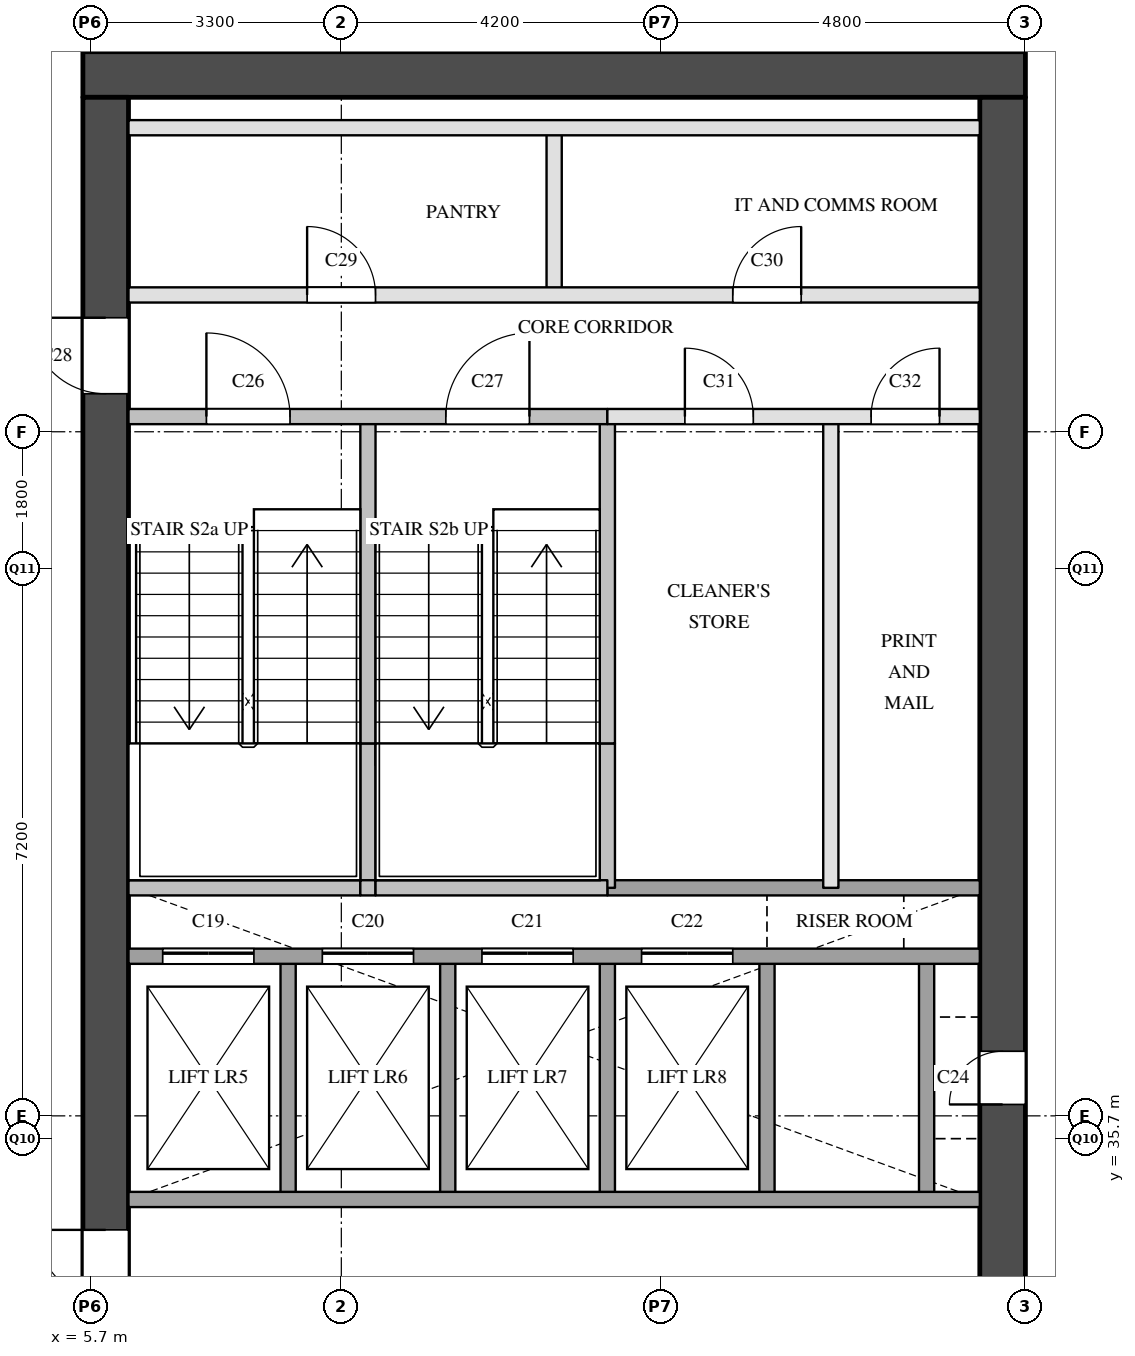
"""IFC4 building model, lengths in metres.
Left out: names, types, materials, properties, quantities, classifications, styles, units other than length and angle.
Written with IfcOpenShell. Run it as: python <this file> out.ifc"""

import sys

from ifc_helpers import new_model, si_unit, direction, frame, frame_2d, origin, place, context, subcontext, project, spatial, rectangle, extrude, element, fill, save


model = new_model("IFC4")
c1 = context("Model", 3, precision=1e-05, world=origin(), true_north=direction((0.0, 1.0)))
c2 = subcontext(c1, "Body", "Model", "MODEL_VIEW")
j1 = project(units=[si_unit("LENGTHUNIT", "METRE"), si_unit("PLANEANGLEUNIT", "RADIAN")], contexts=[c1])
p1 = place(None, origin())
s1 = spatial("IfcSite", under=j1, at=p1, CompositionType="ELEMENT")
p2 = place(p1, origin())
s2 = spatial("IfcBuilding", under=s1, at=p2, CompositionType="ELEMENT")
p3 = place(p2, frame((0.0, 0.0, 77.8)))
s3 = spatial("IfcBuildingStorey", under=s2, at=p3, CompositionType="ELEMENT", Elevation=77.8)
p4 = place(p3, frame((5.6, 49.7, 0.0), z_axis=(0.0, 0.0, 1.0), x_axis=(1.0, 0.0, 0.0)))
e1 = element("IfcWall", 1, at=p4, inside=s3, PredefinedType="SHEAR", context=c2, shape_type="SweptSolid", body=[
    extrude(rectangle(XDim=12.4, YDim=0.6, at=frame_2d((6.2, 0.0))), origin(), (0.0, 0.0, 1.0), 3.5),
])
p5 = place(p3, frame((5.9, 29.1, 0.0), z_axis=(0.0, 0.0, 1.0), x_axis=(0.0, 1.0, 0.0)))
e2 = element("IfcWall", 2, at=p5, inside=s3, PredefinedType="SHEAR", context=c2, shape_type="SweptSolid", body=[
    extrude(rectangle(XDim=20.3, YDim=0.6, at=frame_2d((10.15, 0.0))), origin(), (0.0, 0.0, 1.0), 3.5),
])
p6 = place(p5, frame((3.6, 0.0, 0.0)))
e3 = element("IfcOpeningElement", 3, at=p6, cuts=e2, PredefinedType="OPENING", context=c2, shape_type="SweptSolid", body=[
    extrude(rectangle(XDim=1.8, YDim=2.1, at=frame_2d((0.9, 1.05))), frame((0.0, 0.31, 0.0), z_axis=(0.0, -1.0, 0.0), x_axis=(1.0, 0.0, 0.0)), (0.0, 0.0, 1.0), 0.62),
])
p7 = place(p5, frame((16.4, 0.0, 0.0)))
e4 = element("IfcOpeningElement", 4, at=p7, cuts=e2, PredefinedType="OPENING", context=c2, shape_type="SweptSolid", body=[
    extrude(rectangle(XDim=1.0, YDim=2.1, at=frame_2d((0.5, 1.05))), frame((0.0, 0.31, 0.0), z_axis=(0.0, -1.0, 0.0), x_axis=(1.0, 0.0, 0.0)), (0.0, 0.0, 1.0), 0.62),
])
p8 = place(p3, frame((17.7, 29.1, 0.0), z_axis=(0.0, 0.0, 1.0), x_axis=(0.0, 1.0, 0.0)))
e5 = element("IfcWall", 5, at=p8, inside=s3, PredefinedType="SHEAR", context=c2, shape_type="SweptSolid", body=[
    extrude(rectangle(XDim=20.3, YDim=0.6, at=frame_2d((10.15, 0.0))), origin(), (0.0, 0.0, 1.0), 3.5),
])
p9 = place(p8, frame((1.25, 0.0, 0.0)))
e6 = element("IfcOpeningElement", 6, at=p9, cuts=e5, PredefinedType="OPENING", context=c2, shape_type="SweptSolid", body=[
    extrude(rectangle(XDim=0.7, YDim=2.1, at=frame_2d((0.35, 1.05))), frame((0.0, 0.31, 0.0), z_axis=(0.0, -1.0, 0.0), x_axis=(1.0, 0.0, 0.0)), (0.0, 0.0, 1.0), 0.62),
])
p10 = place(p8, frame((7.05, 0.0, 0.0)))
e7 = element("IfcOpeningElement", 7, at=p10, cuts=e5, PredefinedType="OPENING", context=c2, shape_type="SweptSolid", body=[
    extrude(rectangle(XDim=0.7, YDim=2.1, at=frame_2d((0.35, 1.05))), frame((0.0, 0.31, 0.0), z_axis=(0.0, -1.0, 0.0), x_axis=(1.0, 0.0, 0.0)), (0.0, 0.0, 1.0), 0.62),
])
p11 = place(p3, frame((8.3, 34.9, 0.0), z_axis=(0.0, 0.0, 1.0), x_axis=(0.0, 1.0, 0.0)))
e8 = element("IfcWall", 8, at=p11, inside=s3, PredefinedType="SOLIDWALL", context=c2, shape_type="SweptSolid", body=[
    extrude(rectangle(XDim=3.2, YDim=0.2, at=frame_2d((1.6, 0.0))), origin(), (0.0, 0.0, 1.0), 3.5),
])
p12 = place(p3, frame((9.35, 39.0, 0.0), z_axis=(0.0, 0.0, 1.0), x_axis=(0.0, 1.0, 0.0)))
e9 = element("IfcWall", 9, at=p12, inside=s3, PredefinedType="SOLIDWALL", context=c2, shape_type="SweptSolid", body=[
    extrude(rectangle(XDim=1.9, YDim=0.2, at=frame_2d((0.95, 0.0))), origin(), (0.0, 0.0, 1.0), 3.5),
])
p13 = place(p3, frame((9.35, 40.9, 0.0), z_axis=(0.0, 0.0, 1.0), x_axis=(0.0, 1.0, 0.0)))
e10 = element("IfcWall", 10, at=p13, inside=s3, PredefinedType="SOLIDWALL", context=c2, shape_type="SweptSolid", body=[
    extrude(rectangle(XDim=4.3, YDim=0.2, at=frame_2d((2.15, 0.0))), origin(), (0.0, 0.0, 1.0), 3.5),
])
p14 = place(p3, frame((10.4, 34.9, 0.0), z_axis=(0.0, 0.0, 1.0), x_axis=(0.0, 1.0, 0.0)))
e11 = element("IfcWall", 11, at=p14, inside=s3, PredefinedType="SOLIDWALL", context=c2, shape_type="SweptSolid", body=[
    extrude(rectangle(XDim=3.2, YDim=0.2, at=frame_2d((1.6, 0.0))), origin(), (0.0, 0.0, 1.0), 3.5),
])
p15 = place(p3, frame((11.8, 46.8, 0.0), z_axis=(0.0, 0.0, 1.0), x_axis=(0.0, 1.0, 0.0)))
e12 = element("IfcWall", 12, at=p15, inside=s3, PredefinedType="PARTITIONING", context=c2, shape_type="SweptSolid", body=[
    extrude(rectangle(XDim=2.2, YDim=0.2, at=frame_2d((1.1, 0.0))), origin(), (0.0, 0.0, 1.0), 3.5),
])
p16 = place(p3, frame((12.5, 34.9, 0.0), z_axis=(0.0, 0.0, 1.0), x_axis=(0.0, 1.0, 0.0)))
e13 = element("IfcWall", 13, at=p16, inside=s3, PredefinedType="SOLIDWALL", context=c2, shape_type="SweptSolid", body=[
    extrude(rectangle(XDim=3.2, YDim=0.2, at=frame_2d((1.6, 0.0))), origin(), (0.0, 0.0, 1.0), 3.5),
])
p17 = place(p3, frame((12.5, 39.0, 0.0), z_axis=(0.0, 0.0, 1.0), x_axis=(0.0, 1.0, 0.0)))
e14 = element("IfcWall", 14, at=p17, inside=s3, PredefinedType="SOLIDWALL", context=c2, shape_type="SweptSolid", body=[
    extrude(rectangle(XDim=1.9, YDim=0.2, at=frame_2d((0.95, 0.0))), origin(), (0.0, 0.0, 1.0), 3.5),
])
p18 = place(p3, frame((12.5, 40.9, 0.0), z_axis=(0.0, 0.0, 1.0), x_axis=(0.0, 1.0, 0.0)))
e15 = element("IfcWall", 15, at=p18, inside=s3, PredefinedType="SOLIDWALL", context=c2, shape_type="SweptSolid", body=[
    extrude(rectangle(XDim=4.3, YDim=0.2, at=frame_2d((2.15, 0.0))), origin(), (0.0, 0.0, 1.0), 3.5),
])
p19 = place(p3, frame((14.6, 34.9, 0.0), z_axis=(0.0, 0.0, 1.0), x_axis=(0.0, 1.0, 0.0)))
e16 = element("IfcWall", 16, at=p19, inside=s3, PredefinedType="SOLIDWALL", context=c2, shape_type="SweptSolid", body=[
    extrude(rectangle(XDim=3.2, YDim=0.2, at=frame_2d((1.6, 0.0))), origin(), (0.0, 0.0, 1.0), 3.5),
])
p20 = place(p3, frame((15.44, 39.0, 0.0), z_axis=(0.0, 0.0, 1.0), x_axis=(0.0, 1.0, 0.0)))
e17 = element("IfcWall", 17, at=p20, inside=s3, PredefinedType="PARTITIONING", context=c2, shape_type="SweptSolid", body=[
    extrude(rectangle(XDim=6.2, YDim=0.2, at=frame_2d((3.1, 0.0))), origin(), (0.0, 0.0, 1.0), 3.5),
])
p21 = place(p3, frame((16.7, 34.9, 0.0), z_axis=(0.0, 0.0, 1.0), x_axis=(0.0, 1.0, 0.0)))
e18 = element("IfcWall", 18, at=p21, inside=s3, PredefinedType="SOLIDWALL", context=c2, shape_type="SweptSolid", body=[
    extrude(rectangle(XDim=3.2, YDim=0.2, at=frame_2d((1.6, 0.0))), origin(), (0.0, 0.0, 1.0), 3.5),
])
p22 = place(p3, frame((6.2, 34.9, 0.0), z_axis=(0.0, 0.0, 1.0), x_axis=(1.0, 0.0, 0.0)))
e19 = element("IfcWall", 19, at=p22, inside=s3, PredefinedType="SOLIDWALL", context=c2, shape_type="SweptSolid", body=[
    extrude(rectangle(XDim=11.2, YDim=0.2, at=frame_2d((5.6, 0.0))), origin(), (0.0, 0.0, 1.0), 3.5),
])
p23 = place(p3, frame((6.2, 38.1, 0.0), z_axis=(0.0, 0.0, 1.0), x_axis=(1.0, 0.0, 0.0)))
e20 = element("IfcWall", 20, at=p23, inside=s3, PredefinedType="SOLIDWALL", context=c2, shape_type="SweptSolid", body=[
    extrude(rectangle(XDim=11.2, YDim=0.2, at=frame_2d((5.6, 0.0))), origin(), (0.0, 0.0, 1.0), 3.5),
])
p24 = place(p23, frame((0.45, 0.0, 0.0)))
e21 = element("IfcOpeningElement", 21, at=p24, cuts=e20, PredefinedType="OPENING", context=c2, shape_type="SweptSolid", body=[
    extrude(rectangle(XDim=1.2, YDim=2.1, at=frame_2d((0.6, 1.05))), frame((0.0, 0.11, 0.0), z_axis=(0.0, -1.0, 0.0), x_axis=(1.0, 0.0, 0.0)), (0.0, 0.0, 1.0), 0.22),
])
p25 = place(p23, frame((2.55, 0.0, 0.0)))
e22 = element("IfcOpeningElement", 22, at=p25, cuts=e20, PredefinedType="OPENING", context=c2, shape_type="SweptSolid", body=[
    extrude(rectangle(XDim=1.2, YDim=2.1, at=frame_2d((0.6, 1.05))), frame((0.0, 0.11, 0.0), z_axis=(0.0, -1.0, 0.0), x_axis=(1.0, 0.0, 0.0)), (0.0, 0.0, 1.0), 0.22),
])
p26 = place(p23, frame((4.65, 0.0, 0.0)))
e23 = element("IfcOpeningElement", 23, at=p26, cuts=e20, PredefinedType="OPENING", context=c2, shape_type="SweptSolid", body=[
    extrude(rectangle(XDim=1.2, YDim=2.1, at=frame_2d((0.6, 1.05))), frame((0.0, 0.11, 0.0), z_axis=(0.0, -1.0, 0.0), x_axis=(1.0, 0.0, 0.0)), (0.0, 0.0, 1.0), 0.22),
])
p27 = place(p23, frame((6.75, 0.0, 0.0)))
e24 = element("IfcOpeningElement", 24, at=p27, cuts=e20, PredefinedType="OPENING", context=c2, shape_type="SweptSolid", body=[
    extrude(rectangle(XDim=1.2, YDim=2.1, at=frame_2d((0.6, 1.05))), frame((0.0, 0.11, 0.0), z_axis=(0.0, -1.0, 0.0), x_axis=(1.0, 0.0, 0.0)), (0.0, 0.0, 1.0), 0.22),
])
p28 = place(p3, frame((12.5, 39.0, 0.0), z_axis=(0.0, 0.0, 1.0), x_axis=(1.0, 0.0, 0.0)))
e25 = element("IfcWall", 25, at=p28, inside=s3, PredefinedType="SOLIDWALL", context=c2, shape_type="SweptSolid", body=[
    extrude(rectangle(XDim=4.9, YDim=0.2, at=frame_2d((2.45, 0.0))), origin(), (0.0, 0.0, 1.0), 3.5),
])
p29 = place(p3, frame((6.2, 39.0, 0.0), z_axis=(0.0, 0.0, 1.0), x_axis=(1.0, 0.0, 0.0)))
e26 = element("IfcWall", 26, at=p29, inside=s3, PredefinedType="SOLIDWALL", context=c2, shape_type="SweptSolid", body=[
    extrude(rectangle(XDim=3.05, YDim=0.2, at=frame_2d((1.525, 0.0))), origin(), (0.0, 0.0, 1.0), 3.5),
])
p30 = place(p3, frame((9.25, 39.0, 0.0), z_axis=(0.0, 0.0, 1.0), x_axis=(1.0, 0.0, 0.0)))
e27 = element("IfcWall", 27, at=p30, inside=s3, PredefinedType="SOLIDWALL", context=c2, shape_type="SweptSolid", body=[
    extrude(rectangle(XDim=0.2, YDim=0.2, at=frame_2d((0.1, 0.0))), origin(), (0.0, 0.0, 1.0), 3.5),
])
p31 = place(p3, frame((9.45, 39.0, 0.0), z_axis=(0.0, 0.0, 1.0), x_axis=(1.0, 0.0, 0.0)))
e28 = element("IfcWall", 28, at=p31, inside=s3, PredefinedType="SOLIDWALL", context=c2, shape_type="SweptSolid", body=[
    extrude(rectangle(XDim=3.05, YDim=0.2, at=frame_2d((1.525, 0.0))), origin(), (0.0, 0.0, 1.0), 3.5),
])
p32 = place(p3, frame((12.5, 45.2, 0.0), z_axis=(0.0, 0.0, 1.0), x_axis=(1.0, 0.0, 0.0)))
e29 = element("IfcWall", 29, at=p32, inside=s3, PredefinedType="PARTITIONING", context=c2, shape_type="SweptSolid", body=[
    extrude(rectangle(XDim=4.9, YDim=0.2, at=frame_2d((2.45, 0.0))), origin(), (0.0, 0.0, 1.0), 3.5),
])
p33 = place(p32, frame((1.02, 0.0, 0.0)))
e30 = element("IfcOpeningElement", 30, at=p33, cuts=e29, PredefinedType="OPENING", context=c2, shape_type="SweptSolid", body=[
    extrude(rectangle(XDim=0.9, YDim=2.1, at=frame_2d((0.45, 1.05))), frame((0.0, 0.11, 0.0), z_axis=(0.0, -1.0, 0.0), x_axis=(1.0, 0.0, 0.0)), (0.0, 0.0, 1.0), 0.22),
])
p34 = place(p32, frame((3.47, 0.0, 0.0)))
e31 = element("IfcOpeningElement", 31, at=p34, cuts=e29, PredefinedType="OPENING", context=c2, shape_type="SweptSolid", body=[
    extrude(rectangle(XDim=0.9, YDim=2.1, at=frame_2d((0.45, 1.05))), frame((0.0, 0.11, 0.0), z_axis=(0.0, -1.0, 0.0), x_axis=(1.0, 0.0, 0.0)), (0.0, 0.0, 1.0), 0.22),
])
p35 = place(p3, frame((6.2, 45.2, 0.0), z_axis=(0.0, 0.0, 1.0), x_axis=(1.0, 0.0, 0.0)))
e32 = element("IfcWall", 32, at=p35, inside=s3, PredefinedType="SOLIDWALL", context=c2, shape_type="SweptSolid", body=[
    extrude(rectangle(XDim=6.3, YDim=0.2, at=frame_2d((3.15, 0.0))), origin(), (0.0, 0.0, 1.0), 3.5),
])
p36 = place(p35, frame((1.025, 0.0, 0.0)))
e33 = element("IfcOpeningElement", 33, at=p36, cuts=e32, PredefinedType="OPENING", context=c2, shape_type="SweptSolid", body=[
    extrude(rectangle(XDim=1.1, YDim=2.1, at=frame_2d((0.55, 1.05))), frame((0.0, 0.11, 0.0), z_axis=(0.0, -1.0, 0.0), x_axis=(1.0, 0.0, 0.0)), (0.0, 0.0, 1.0), 0.22),
])
p37 = place(p35, frame((4.175, 0.0, 0.0)))
e34 = element("IfcOpeningElement", 34, at=p37, cuts=e32, PredefinedType="OPENING", context=c2, shape_type="SweptSolid", body=[
    extrude(rectangle(XDim=1.1, YDim=2.1, at=frame_2d((0.55, 1.05))), frame((0.0, 0.11, 0.0), z_axis=(0.0, -1.0, 0.0), x_axis=(1.0, 0.0, 0.0)), (0.0, 0.0, 1.0), 0.22),
])
p38 = place(p3, frame((6.2, 46.8, 0.0), z_axis=(0.0, 0.0, 1.0), x_axis=(1.0, 0.0, 0.0)))
e35 = element("IfcWall", 35, at=p38, inside=s3, PredefinedType="PARTITIONING", context=c2, shape_type="SweptSolid", body=[
    extrude(rectangle(XDim=11.2, YDim=0.2, at=frame_2d((5.6, 0.0))), origin(), (0.0, 0.0, 1.0), 3.5),
])
p39 = place(p38, frame((2.35, 0.0, 0.0)))
e36 = element("IfcOpeningElement", 36, at=p39, cuts=e35, PredefinedType="OPENING", context=c2, shape_type="SweptSolid", body=[
    extrude(rectangle(XDim=0.9, YDim=2.1, at=frame_2d((0.45, 1.05))), frame((0.0, 0.11, 0.0), z_axis=(0.0, -1.0, 0.0), x_axis=(1.0, 0.0, 0.0)), (0.0, 0.0, 1.0), 0.22),
])
p40 = place(p38, frame((7.95, 0.0, 0.0)))
e37 = element("IfcOpeningElement", 37, at=p40, cuts=e35, PredefinedType="OPENING", context=c2, shape_type="SweptSolid", body=[
    extrude(rectangle(XDim=0.9, YDim=2.1, at=frame_2d((0.45, 1.05))), frame((0.0, 0.11, 0.0), z_axis=(0.0, -1.0, 0.0), x_axis=(1.0, 0.0, 0.0)), (0.0, 0.0, 1.0), 0.22),
])
p41 = place(p3, frame((6.2, 49.0, 0.0), z_axis=(0.0, 0.0, 1.0), x_axis=(1.0, 0.0, 0.0)))
e38 = element("IfcWall", 38, at=p41, inside=s3, PredefinedType="PARTITIONING", context=c2, shape_type="SweptSolid", body=[
    extrude(rectangle(XDim=11.2, YDim=0.2, at=frame_2d((5.6, 0.0))), origin(), (0.0, 0.0, 1.0), 3.5),
])
p42 = place(p24, origin())
e39 = element("IfcDoor", 39, at=p42, inside=s3, OperationType="SLIDING_TO_LEFT", PredefinedType="DOOR", context=c2, shape_type="SweptSolid", body=[
    extrude(rectangle(XDim=1.2, YDim=2.1, at=frame_2d((0.6, 1.05))), frame((0.0, 0.025, 0.0), z_axis=(0.0, -1.0, 0.0), x_axis=(1.0, 0.0, 0.0)), (0.0, 0.0, 1.0), 0.05),
])
fill(e21, e39)
p43 = place(p25, origin())
e40 = element("IfcDoor", 40, at=p43, inside=s3, OperationType="SLIDING_TO_LEFT", PredefinedType="DOOR", context=c2, shape_type="SweptSolid", body=[
    extrude(rectangle(XDim=1.2, YDim=2.1, at=frame_2d((0.6, 1.05))), frame((0.0, 0.025, 0.0), z_axis=(0.0, -1.0, 0.0), x_axis=(1.0, 0.0, 0.0)), (0.0, 0.0, 1.0), 0.05),
])
fill(e22, e40)
p44 = place(p26, origin())
e41 = element("IfcDoor", 41, at=p44, inside=s3, OperationType="SLIDING_TO_LEFT", PredefinedType="DOOR", context=c2, shape_type="SweptSolid", body=[
    extrude(rectangle(XDim=1.2, YDim=2.1, at=frame_2d((0.6, 1.05))), frame((0.0, 0.025, 0.0), z_axis=(0.0, -1.0, 0.0), x_axis=(1.0, 0.0, 0.0)), (0.0, 0.0, 1.0), 0.05),
])
fill(e23, e41)
p45 = place(p27, origin())
e42 = element("IfcDoor", 42, at=p45, inside=s3, OperationType="SLIDING_TO_LEFT", PredefinedType="DOOR", context=c2, shape_type="SweptSolid", body=[
    extrude(rectangle(XDim=1.2, YDim=2.1, at=frame_2d((0.6, 1.05))), frame((0.0, 0.025, 0.0), z_axis=(0.0, -1.0, 0.0), x_axis=(1.0, 0.0, 0.0)), (0.0, 0.0, 1.0), 0.05),
])
fill(e24, e42)
p46 = place(p10, origin())
e43 = element("IfcDoor", 43, at=p46, inside=s3, OperationType="SINGLE_SWING_LEFT", PredefinedType="DOOR", context=c2, shape_type="SweptSolid", body=[
    extrude(rectangle(XDim=0.7, YDim=2.1, at=frame_2d((0.35, 1.05))), frame((0.0, 0.025, 0.0), z_axis=(0.0, -1.0, 0.0), x_axis=(1.0, 0.0, 0.0)), (0.0, 0.0, 1.0), 0.05),
])
fill(e7, e43)
p47 = place(p6, origin())
e44 = element("IfcDoor", 44, at=p47, inside=s3, OperationType="DOUBLE_DOOR_SINGLE_SWING", PredefinedType="DOOR", context=c2, shape_type="SweptSolid", body=[
    extrude(rectangle(XDim=1.8, YDim=2.1, at=frame_2d((0.9, 1.05))), frame((0.0, 0.025, 0.0), z_axis=(0.0, -1.0, 0.0), x_axis=(1.0, 0.0, 0.0)), (0.0, 0.0, 1.0), 0.05),
])
fill(e3, e44)
p48 = place(p36, origin())
e45 = element("IfcDoor", 45, at=p48, inside=s3, OperationType="SINGLE_SWING_LEFT", PredefinedType="DOOR", context=c2, shape_type="SweptSolid", body=[
    extrude(rectangle(XDim=1.1, YDim=2.1, at=frame_2d((0.55, 1.05))), frame((0.0, 0.025, 0.0), z_axis=(0.0, -1.0, 0.0), x_axis=(1.0, 0.0, 0.0)), (0.0, 0.0, 1.0), 0.05),
])
fill(e33, e45)
p49 = place(p37, origin())
e46 = element("IfcDoor", 46, at=p49, inside=s3, OperationType="SINGLE_SWING_RIGHT", PredefinedType="DOOR", context=c2, shape_type="SweptSolid", body=[
    extrude(rectangle(XDim=1.1, YDim=2.1, at=frame_2d((0.55, 1.05))), frame((0.0, 0.025, 0.0), z_axis=(0.0, -1.0, 0.0), x_axis=(1.0, 0.0, 0.0)), (0.0, 0.0, 1.0), 0.05),
])
fill(e34, e46)
p50 = place(p7, origin())
e47 = element("IfcDoor", 47, at=p50, inside=s3, OperationType="SINGLE_SWING_RIGHT", PredefinedType="DOOR", context=c2, shape_type="SweptSolid", body=[
    extrude(rectangle(XDim=1.0, YDim=2.1, at=frame_2d((0.5, 1.05))), frame((0.0, 0.025, 0.0), z_axis=(0.0, -1.0, 0.0), x_axis=(1.0, 0.0, 0.0)), (0.0, 0.0, 1.0), 0.05),
])
fill(e4, e47)
p51 = place(p39, origin())
e48 = element("IfcDoor", 48, at=p51, inside=s3, OperationType="SINGLE_SWING_LEFT", PredefinedType="DOOR", context=c2, shape_type="SweptSolid", body=[
    extrude(rectangle(XDim=0.9, YDim=2.1, at=frame_2d((0.45, 1.05))), frame((0.0, 0.025, 0.0), z_axis=(0.0, -1.0, 0.0), x_axis=(1.0, 0.0, 0.0)), (0.0, 0.0, 1.0), 0.05),
])
fill(e36, e48)
p52 = place(p40, origin())
e49 = element("IfcDoor", 49, at=p52, inside=s3, OperationType="SINGLE_SWING_RIGHT", PredefinedType="DOOR", context=c2, shape_type="SweptSolid", body=[
    extrude(rectangle(XDim=0.9, YDim=2.1, at=frame_2d((0.45, 1.05))), frame((0.0, 0.025, 0.0), z_axis=(0.0, -1.0, 0.0), x_axis=(1.0, 0.0, 0.0)), (0.0, 0.0, 1.0), 0.05),
])
fill(e37, e49)
p53 = place(p33, origin())
e50 = element("IfcDoor", 50, at=p53, inside=s3, OperationType="SINGLE_SWING_LEFT", PredefinedType="DOOR", context=c2, shape_type="SweptSolid", body=[
    extrude(rectangle(XDim=0.9, YDim=2.1, at=frame_2d((0.45, 1.05))), frame((0.0, 0.025, 0.0), z_axis=(0.0, -1.0, 0.0), x_axis=(1.0, 0.0, 0.0)), (0.0, 0.0, 1.0), 0.05),
])
fill(e30, e50)
p54 = place(p34, origin())
e51 = element("IfcDoor", 51, at=p54, inside=s3, OperationType="SINGLE_SWING_RIGHT", PredefinedType="DOOR", context=c2, shape_type="SweptSolid", body=[
    extrude(rectangle(XDim=0.9, YDim=2.1, at=frame_2d((0.45, 1.05))), frame((0.0, 0.025, 0.0), z_axis=(0.0, -1.0, 0.0), x_axis=(1.0, 0.0, 0.0)), (0.0, 0.0, 1.0), 0.05),
])
fill(e31, e51)
save(model, sys.argv[1])
